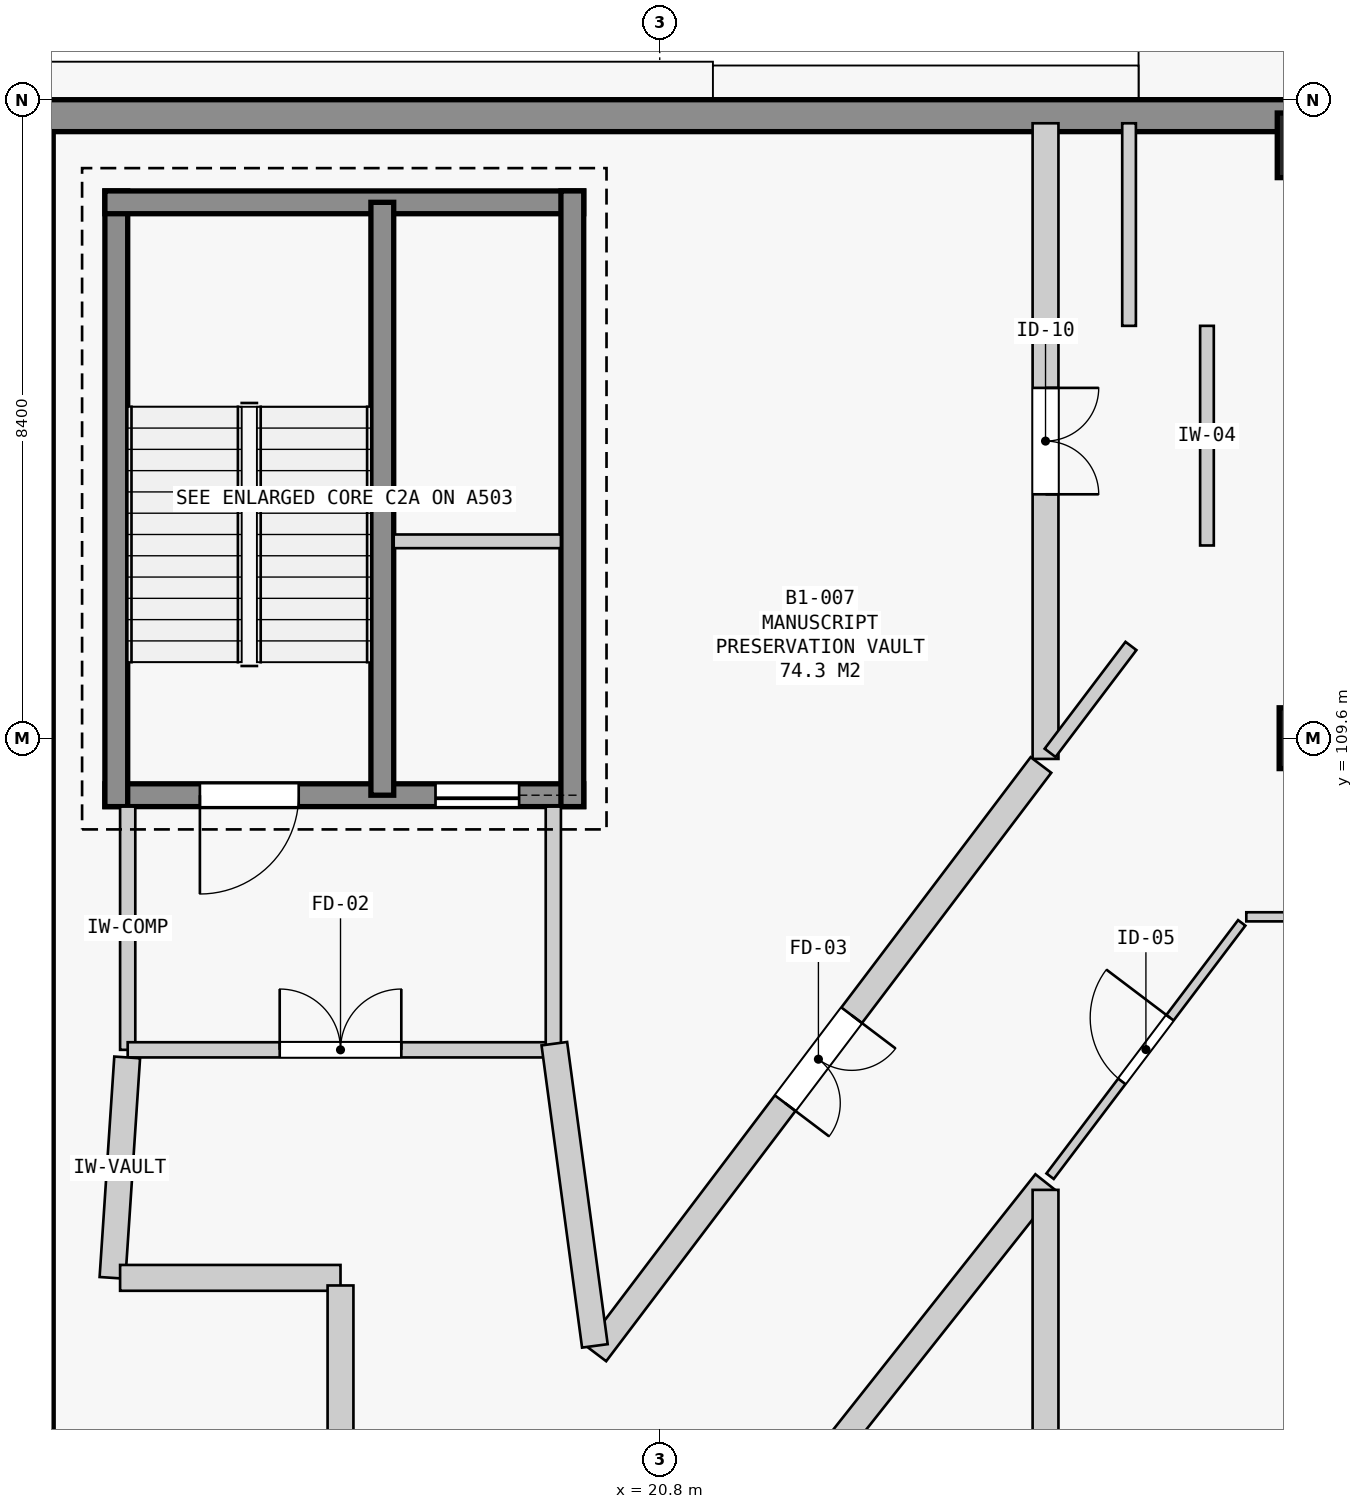
"""IFC4 building model, lengths in metres.
Left out: names, types, materials, properties, quantities, classifications, styles, units other than length and angle.
Written with IfcOpenShell. Run it as: python <this file> out.ifc"""

import sys

from ifc_helpers import new_model, si_unit, direction, frame, frame_2d, origin, origin_2d, place, context, subcontext, project, spatial, rectangle, extrude, element, fill, save


model = new_model("IFC4")
c1 = context("Model", 3, precision=1e-05, world=origin(), true_north=direction((0.0, 1.0)))
c2 = subcontext(c1, "Body", "Model", "MODEL_VIEW")
j1 = project(units=[si_unit("LENGTHUNIT", "METRE"), si_unit("PLANEANGLEUNIT", "RADIAN")], contexts=[c1])
p1 = place(None, origin())
s1 = spatial("IfcSite", under=j1, at=p1, CompositionType="ELEMENT")
p2 = place(p1, origin())
s2 = spatial("IfcBuilding", under=s1, at=p2, CompositionType="ELEMENT")
p3 = place(p2, frame((0.0, 0.0, -4.5)))
s3 = spatial("IfcBuildingStorey", under=s2, at=p3, CompositionType="ELEMENT", Elevation=-4.5)
p4 = place(p3, frame((29.2, 109.6, 0.0), z_axis=(0.0, 0.0, 1.0), x_axis=(1.0, 0.0, 0.0)))
e1 = element("IfcColumn", 1, at=p4, inside=s3, PredefinedType="COLUMN", context=c2, shape_type="SweptSolid", body=[
    extrude(rectangle(XDim=0.5, YDim=0.8, at=origin_2d()), origin(), (0.0, 0.0, 1.0), 4.5),
])
p5 = place(p3, frame((29.2, 117.4, 0.0), z_axis=(0.0, 0.0, 1.0), x_axis=(1.0, 0.0, 0.0)))
e2 = element("IfcColumn", 2, at=p5, inside=s3, PredefinedType="COLUMN", context=c2, shape_type="SweptSolid", body=[
    extrude(rectangle(XDim=0.55, YDim=0.85, at=origin_2d()), origin(), (0.0, 0.0, 1.0), 4.5),
])
p6 = place(p3, frame((12.61, 88.21, 0.0), z_axis=(0.0, 0.0, 1.0), x_axis=(0.0, 1.0, 0.0)))
e3 = element("IfcWall", 3, at=p6, inside=s3, PredefinedType="SOLIDWALL", context=c2, shape_type="SweptSolid", body=[
    extrude(rectangle(XDim=29.58, YDim=0.42, at=frame_2d((14.79, 0.0))), origin(), (0.0, 0.0, 1.0), 4.5),
])
p7 = place(p3, frame((12.61, 117.79, 0.0), z_axis=(0.0, 0.0, 1.0), x_axis=(1.0, 0.0, 0.0)))
e4 = element("IfcWall", 4, at=p7, inside=s3, PredefinedType="SOLIDWALL", context=c2, shape_type="SweptSolid", body=[
    extrude(rectangle(XDim=33.08, YDim=0.42, at=frame_2d((16.54, 0.0))), origin(), (0.0, 0.0, 1.0), 4.5),
])
p8 = place(p3, frame((19.8, 108.85, 0.0), z_axis=(0.0, 0.0, 1.0), x_axis=(-1.0, 0.0, 0.0)))
e5 = element("IfcWall", 5, at=p8, inside=s3, PredefinedType="SHEAR", context=c2, shape_type="SweptSolid", body=[
    extrude(rectangle(XDim=6.3, YDim=0.3, at=frame_2d((3.15, 0.0))), origin(), (0.0, 0.0, 1.0), 4.1),
])
p9 = place(p8, frame((3.75, 0.0, 0.0)))
e6 = element("IfcOpeningElement", 6, at=p9, cuts=e5, PredefinedType="OPENING", context=c2, shape_type="SweptSolid", body=[
    extrude(rectangle(XDim=1.3, YDim=2.2, at=frame_2d((0.65, 1.1))), frame((0.0, 0.16, 0.0), z_axis=(0.0, -1.0, 0.0), x_axis=(1.0, 0.0, 0.0)), (0.0, 0.0, 1.0), 0.32),
])
p10 = place(p8, frame((0.85, 0.0, 0.0)))
e7 = element("IfcOpeningElement", 7, at=p10, cuts=e5, PredefinedType="OPENING", context=c2, shape_type="SweptSolid", body=[
    extrude(rectangle(XDim=1.1, YDim=2.15, at=frame_2d((0.55, 1.075))), frame((0.0, 0.16, 0.0), z_axis=(0.0, -1.0, 0.0), x_axis=(1.0, 0.0, 0.0)), (0.0, 0.0, 1.0), 0.32),
])
p11 = place(p3, frame((13.65, 108.7, 0.0), z_axis=(0.0, 0.0, 1.0), x_axis=(0.0, 1.0, 0.0)))
e8 = element("IfcWall", 8, at=p11, inside=s3, PredefinedType="SHEAR", context=c2, shape_type="SweptSolid", body=[
    extrude(rectangle(XDim=8.1, YDim=0.3, at=frame_2d((4.05, 0.0))), origin(), (0.0, 0.0, 1.0), 4.1),
])
p12 = place(p3, frame((13.5, 116.65, 0.0), z_axis=(0.0, 0.0, 1.0), x_axis=(1.0, 0.0, 0.0)))
e9 = element("IfcWall", 9, at=p12, inside=s3, PredefinedType="SHEAR", context=c2, shape_type="SweptSolid", body=[
    extrude(rectangle(XDim=6.3, YDim=0.3, at=frame_2d((3.15, 0.0))), origin(), (0.0, 0.0, 1.0), 4.1),
])
p13 = place(p3, frame((19.65, 116.8, 0.0), z_axis=(0.0, 0.0, 1.0), x_axis=(0.0, -1.0, 0.0)))
e10 = element("IfcWall", 10, at=p13, inside=s3, PredefinedType="SHEAR", context=c2, shape_type="SweptSolid", body=[
    extrude(rectangle(XDim=8.1, YDim=0.3, at=frame_2d((4.05, 0.0))), origin(), (0.0, 0.0, 1.0), 4.1),
])
p14 = place(p3, frame((17.15, 108.85, 0.0), z_axis=(0.0, 0.0, 1.0), x_axis=(0.0, 1.0, 0.0)))
e11 = element("IfcWall", 11, at=p14, inside=s3, PredefinedType="SHEAR", context=c2, shape_type="SweptSolid", body=[
    extrude(rectangle(XDim=7.8, YDim=0.3, at=frame_2d((3.9, 0.0))), origin(), (0.0, 0.0, 1.0), 4.1),
])
p15 = place(p3, frame((17.3, 112.19, 0.0), z_axis=(0.0, 0.0, 1.0), x_axis=(1.0, 0.0, 0.0)))
e12 = element("IfcWall", 12, at=p15, inside=s3, PredefinedType="PARTITIONING", context=c2, shape_type="SweptSolid", body=[
    extrude(rectangle(XDim=2.2, YDim=0.18, at=frame_2d((1.1, 0.0))), origin(), (0.0, 0.0, 1.0), 4.1),
])
p16 = place(p3, frame((13.8, 108.7, 0.0), z_axis=(0.0, 0.0, 1.0), x_axis=(0.0, -1.0, 0.0)))
e13 = element("IfcWall", 13, at=p16, inside=s3, PredefinedType="STANDARD", context=c2, shape_type="SweptSolid", body=[
    extrude(rectangle(XDim=3.2, YDim=0.2, at=frame_2d((1.6, 0.0))), origin(), (0.0, 0.0, 1.0), 4.1),
])
p17 = place(p3, frame((13.8, 105.5, 0.0), z_axis=(0.0, 0.0, 1.0), x_axis=(1.0, 0.0, 0.0)))
e14 = element("IfcWall", 14, at=p17, inside=s3, PredefinedType="STANDARD", context=c2, shape_type="SweptSolid", body=[
    extrude(rectangle(XDim=5.6, YDim=0.2, at=frame_2d((2.8, 0.0))), origin(), (0.0, 0.0, 1.0), 4.1),
])
p18 = place(p17, frame((2.0, 0.0, 0.0)))
e15 = element("IfcOpeningElement", 15, at=p18, cuts=e14, PredefinedType="OPENING", context=c2, shape_type="SweptSolid", body=[
    extrude(rectangle(XDim=1.6, YDim=2.2, at=frame_2d((0.8, 1.1))), frame((0.0, 0.11, 0.0), z_axis=(0.0, -1.0, 0.0), x_axis=(1.0, 0.0, 0.0)), (0.0, 0.0, 1.0), 0.22),
])
p19 = place(p3, frame((19.4, 105.5, 0.0), z_axis=(0.0, 0.0, 1.0), x_axis=(0.0, 1.0, 0.0)))
e16 = element("IfcWall", 16, at=p19, inside=s3, PredefinedType="STANDARD", context=c2, shape_type="SweptSolid", body=[
    extrude(rectangle(XDim=3.2, YDim=0.2, at=frame_2d((1.6, 0.0))), origin(), (0.0, 0.0, 1.0), 4.1),
])
p20 = place(p3, frame((13.793, 105.4, 0.0), z_axis=(0.0, 0.0, 1.0), x_axis=(-0.066440960793, -0.997790358106, 0.0)))
e17 = element("IfcWall", 17, at=p20, inside=s3, PredefinedType="STANDARD", context=c2, shape_type="SweptSolid", body=[
    extrude(rectangle(XDim=2.906, YDim=0.34, at=frame_2d((1.453, 0.0))), origin(), (0.0, 0.0, 1.0), 4.1),
])
p21 = place(p3, frame((13.7, 102.5, 0.0), z_axis=(0.0, 0.0, 1.0), x_axis=(1.0, 0.0, 0.0)))
e18 = element("IfcWall", 18, at=p21, inside=s3, PredefinedType="STANDARD", context=c2, shape_type="SweptSolid", body=[
    extrude(rectangle(XDim=2.9, YDim=0.34, at=frame_2d((1.45, 0.0))), origin(), (0.0, 0.0, 1.0), 4.1),
])
p22 = place(p3, frame((16.6, 102.4, 0.0), z_axis=(0.0, 0.0, 1.0), x_axis=(0.0, -1.0, 0.0)))
e19 = element("IfcWall", 19, at=p22, inside=s3, PredefinedType="STANDARD", context=c2, shape_type="SweptSolid", body=[
    extrude(rectangle(XDim=5.9, YDim=0.34, at=frame_2d((2.95, 0.0))), origin(), (0.0, 0.0, 1.0), 3.23),
])
p23 = place(p3, frame((25.876, 117.69, 0.0), z_axis=(0.0, 0.0, 1.0), x_axis=(0.0, -1.0, 0.0)))
e20 = element("IfcWall", 20, at=p23, inside=s3, PredefinedType="STANDARD", context=c2, shape_type="SweptSolid", body=[
    extrude(rectangle(XDim=8.363, YDim=0.34, at=frame_2d((4.181, 0.0))), origin(), (0.0, 0.0, 1.0), 4.1),
])
p24 = place(p23, frame((3.481, 0.0, 0.0)))
e21 = element("IfcOpeningElement", 21, at=p24, cuts=e20, PredefinedType="OPENING", context=c2, shape_type="SweptSolid", body=[
    extrude(rectangle(XDim=1.4, YDim=2.2, at=frame_2d((0.7, 1.1))), frame((0.0, 0.18, 0.0), z_axis=(0.0, -1.0, 0.0), x_axis=(1.0, 0.0, 0.0)), (0.0, 0.0, 1.0), 0.36),
])
p25 = place(p3, frame((25.816, 109.248, 0.0), z_axis=(0.0, 0.0, 1.0), x_axis=(-0.60326673285, -0.79753949685, 0.0)))
e22 = element("IfcWall", 22, at=p25, inside=s3, PredefinedType="STANDARD", context=c2, shape_type="SweptSolid", body=[
    extrude(rectangle(XDim=9.707, YDim=0.34, at=frame_2d((4.854, 0.0))), origin(), (0.0, 0.0, 1.0), 4.1),
])
p26 = place(p25, frame((4.128, 0.0, 0.0)))
e23 = element("IfcOpeningElement", 23, at=p26, cuts=e22, PredefinedType="OPENING", context=c2, shape_type="SweptSolid", body=[
    extrude(rectangle(XDim=1.45, YDim=2.2, at=frame_2d((0.725, 1.1))), frame((0.0, 0.18, 0.0), z_axis=(0.0, -1.0, 0.0), x_axis=(1.0, 0.0, 0.0)), (0.0, 0.0, 1.0), 0.36),
])
p27 = place(p3, frame((19.947, 101.605, 0.0), z_axis=(0.0, 0.0, 1.0), x_axis=(-0.132980911194, 0.991118598987, 0.0)))
e24 = element("IfcWall", 24, at=p27, inside=s3, PredefinedType="STANDARD", context=c2, shape_type="SweptSolid", body=[
    extrude(rectangle(XDim=4.011, YDim=0.34, at=frame_2d((2.006, 0.0))), origin(), (0.0, 0.0, 1.0), 4.1),
])
p28 = place(p3, frame((19.39, 95.565, 0.0), z_axis=(0.0, 0.0, 1.0), x_axis=(0.620703542818, 0.784045350687, 0.0)))
e25 = element("IfcWall", 25, at=p28, inside=s3, PredefinedType="STANDARD", context=c2, shape_type="SweptSolid", body=[
    extrude(rectangle(XDim=10.449, YDim=0.34, at=frame_2d((5.225, 0.0))), origin(), (0.0, 0.0, 1.0), 3.23),
])
p29 = place(p3, frame((25.876, 103.658, 0.0), z_axis=(0.0, 0.0, 1.0), x_axis=(0.0, -1.0, 0.0)))
e26 = element("IfcWall", 26, at=p29, inside=s3, PredefinedType="STANDARD", context=c2, shape_type="SweptSolid", body=[
    extrude(rectangle(XDim=15.348, YDim=0.34, at=frame_2d((7.674, 0.0))), origin(), (0.0, 0.0, 1.0), 3.23),
])
p30 = place(p29, frame((6.949, 0.0, 0.0)))
e27 = element("IfcOpeningElement", 27, at=p30, cuts=e26, PredefinedType="OPENING", context=c2, shape_type="SweptSolid", body=[
    extrude(rectangle(XDim=1.45, YDim=2.2, at=frame_2d((0.725, 1.1))), frame((0.0, 0.18, 0.0), z_axis=(0.0, -1.0, 0.0), x_axis=(1.0, 0.0, 0.0)), (0.0, 0.0, 1.0), 0.36),
])
p31 = place(p3, frame((28.518, 107.25, 0.0), z_axis=(0.0, 0.0, 1.0), x_axis=(1.0, 0.0, 0.0)))
e28 = element("IfcWall", 28, at=p31, inside=s3, PredefinedType="PARTITIONING", context=c2, shape_type="SweptSolid", body=[
    extrude(rectangle(XDim=2.083, YDim=0.12, at=frame_2d((1.041, 0.0))), origin(), (0.0, 0.0, 1.0), 3.33),
])
p32 = place(p3, frame((25.936, 103.837, 0.0), z_axis=(0.0, 0.0, 1.0), x_axis=(0.603275989972, 0.797532494588, 0.0)))
e29 = element("IfcWall", 29, at=p32, inside=s3, PredefinedType="PARTITIONING", context=c2, shape_type="SweptSolid", body=[
    extrude(rectangle(XDim=4.179, YDim=0.12, at=frame_2d((2.089, 0.0))), origin(), (0.0, 0.0, 1.0), 4.1),
])
p33 = place(p32, frame((1.564, 0.0, 0.0)))
e30 = element("IfcOpeningElement", 30, at=p33, cuts=e29, PredefinedType="OPENING", context=c2, shape_type="SweptSolid", body=[
    extrude(rectangle(XDim=1.05, YDim=2.15, at=frame_2d((0.525, 1.075))), frame((0.0, 0.07, 0.0), z_axis=(0.0, -1.0, 0.0), x_axis=(1.0, 0.0, 0.0)), (0.0, 0.0, 1.0), 0.14),
])
p34 = place(p3, frame((26.975, 117.69, 0.0), z_axis=(0.0, 0.0, 1.0), x_axis=(0.0, -1.0, 0.0)))
e31 = element("IfcWall", 31, at=p34, inside=s3, PredefinedType="PARTITIONING", context=c2, shape_type="SweptSolid", body=[
    extrude(rectangle(XDim=2.665, YDim=0.18, at=frame_2d((1.333, 0.0))), origin(), (0.0, 0.0, 1.0), 4.1),
])
p35 = place(p3, frame((28.0, 115.025, 0.0), z_axis=(0.0, 0.0, 1.0), x_axis=(0.0, -1.0, 0.0)))
e32 = element("IfcWall", 32, at=p35, inside=s3, PredefinedType="PARTITIONING", context=c2, shape_type="SweptSolid", body=[
    extrude(rectangle(XDim=2.889, YDim=0.18, at=frame_2d((1.445, 0.0))), origin(), (0.0, 0.0, 1.0), 4.1),
])
p36 = place(p3, frame((27.0, 110.813, 0.0), z_axis=(0.0, 0.0, 1.0), x_axis=(-0.603273712598, -0.797534217252, 0.0)))
e33 = element("IfcWall", 33, at=p36, inside=s3, PredefinedType="PARTITIONING", context=c2, shape_type="SweptSolid", body=[
    extrude(rectangle(XDim=1.763, YDim=0.18, at=frame_2d((0.882, 0.0))), origin(), (0.0, 0.0, 1.0), 4.1),
])
p37 = place(p9, origin())
e34 = element("IfcDoor", 34, at=p37, inside=s3, OperationType="SINGLE_SWING_RIGHT", PredefinedType="DOOR", context=c2, shape_type="SweptSolid", body=[
    extrude(rectangle(XDim=1.3, YDim=2.2, at=frame_2d((0.65, 1.1))), frame((0.0, 0.025, 0.0), z_axis=(0.0, -1.0, 0.0), x_axis=(1.0, 0.0, 0.0)), (0.0, 0.0, 1.0), 0.05),
])
fill(e6, e34)
p38 = place(p10, origin())
e35 = element("IfcDoor", 35, at=p38, inside=s3, OperationType="SLIDING_TO_LEFT", PredefinedType="DOOR", context=c2, shape_type="SweptSolid", body=[
    extrude(rectangle(XDim=1.1, YDim=2.15, at=frame_2d((0.55, 1.075))), frame((0.0, 0.025, 0.0), z_axis=(0.0, -1.0, 0.0), x_axis=(1.0, 0.0, 0.0)), (0.0, 0.0, 1.0), 0.05),
])
fill(e7, e35)
p39 = place(p18, origin())
e36 = element("IfcDoor", 36, at=p39, inside=s3, OperationType="DOUBLE_DOOR_SINGLE_SWING", PredefinedType="DOOR", context=c2, shape_type="SweptSolid", body=[
    extrude(rectangle(XDim=1.6, YDim=2.2, at=frame_2d((0.8, 1.1))), frame((0.0, 0.025, 0.0), z_axis=(0.0, -1.0, 0.0), x_axis=(1.0, 0.0, 0.0)), (0.0, 0.0, 1.0), 0.05),
])
fill(e15, e36)
p40 = place(p26, origin())
e37 = element("IfcDoor", 37, at=p40, inside=s3, OperationType="DOUBLE_DOOR_SINGLE_SWING", PredefinedType="DOOR", context=c2, shape_type="SweptSolid", body=[
    extrude(rectangle(XDim=1.45, YDim=2.2, at=frame_2d((0.725, 1.1))), frame((0.0, 0.025, 0.0), z_axis=(0.0, -1.0, 0.0), x_axis=(1.0, 0.0, 0.0)), (0.0, 0.0, 1.0), 0.05),
])
fill(e23, e37)
p41 = place(p33, origin())
e38 = element("IfcDoor", 38, at=p41, inside=s3, OperationType="SINGLE_SWING_RIGHT", PredefinedType="DOOR", context=c2, shape_type="SweptSolid", body=[
    extrude(rectangle(XDim=1.05, YDim=2.15, at=frame_2d((0.525, 1.075))), frame((0.0, 0.025, 0.0), z_axis=(0.0, -1.0, 0.0), x_axis=(1.0, 0.0, 0.0)), (0.0, 0.0, 1.0), 0.05),
])
fill(e30, e38)
p42 = place(p24, origin())
e39 = element("IfcDoor", 39, at=p42, inside=s3, OperationType="DOUBLE_DOOR_SINGLE_SWING", PredefinedType="DOOR", context=c2, shape_type="SweptSolid", body=[
    extrude(rectangle(XDim=1.4, YDim=2.2, at=frame_2d((0.7, 1.1))), frame((0.0, 0.025, 0.0), z_axis=(0.0, -1.0, 0.0), x_axis=(1.0, 0.0, 0.0)), (0.0, 0.0, 1.0), 0.05),
])
fill(e21, e39)
save(model, sys.argv[1])
